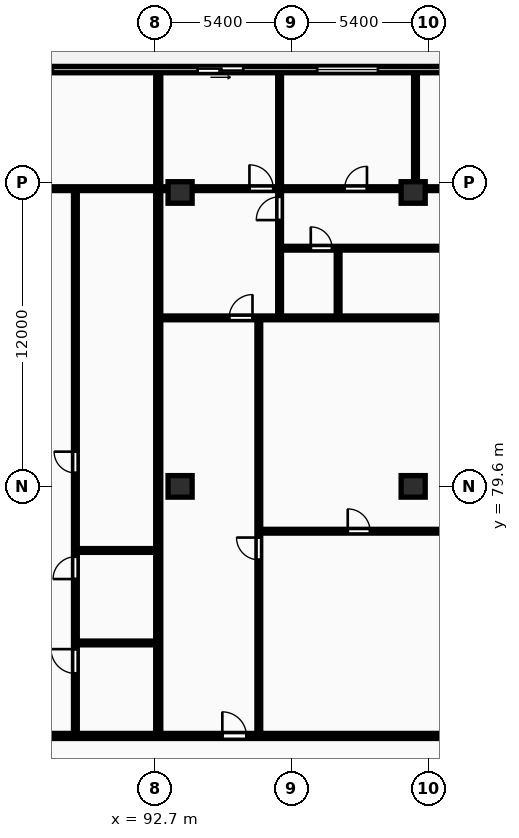
"""IFC4 building model, lengths in metres.
Left out: names, types, materials, properties, quantities, classifications, styles, units other than length and angle.
Written with IfcOpenShell. Run it as: python <this file> out.ifc"""

import sys

from ifc_helpers import new_model, si_unit, direction, frame, frame_2d, origin, origin_2d, place, context, subcontext, project, spatial, rectangle, extrude, element, fill, save


model = new_model("IFC4")
c1 = context("Model", 3, precision=1e-05, world=origin(), true_north=direction((0.0, 1.0)))
c2 = subcontext(c1, "Body", "Model", "MODEL_VIEW")
j1 = project(units=[si_unit("LENGTHUNIT", "METRE"), si_unit("PLANEANGLEUNIT", "RADIAN")], contexts=[c1])
p1 = place(None, origin())
s1 = spatial("IfcSite", under=j1, at=p1, CompositionType="ELEMENT")
p2 = place(p1, origin())
s2 = spatial("IfcBuilding", under=s1, at=p2, CompositionType="ELEMENT")
p3 = place(p2, frame((0.0, 0.0, 126.3)))
s3 = spatial("IfcBuildingStorey", under=s2, at=p3, CompositionType="ELEMENT", Elevation=126.3)
for number, where, z_axis, x_axis in (
    (1, (93.7, 79.6, 0.0), (0.0, 0.0, 1.0), (1.0, 0.0, 0.0)),
    (2, (93.7, 91.2, 0.0), (0.0, 0.0, 1.0), (1.0, 0.0, 0.0)),
    (3, (102.9, 79.6, 0.0), (0.0, 0.0, 1.0), (1.0, 0.0, 0.0)),
    (4, (102.9, 91.2, 0.0), (0.0, 0.0, 1.0), (1.0, 0.0, 0.0)),
):
    element("IfcColumn", number, at=place(p3, frame(where, z_axis=z_axis, x_axis=x_axis)), inside=s3, PredefinedType="COLUMN", context=c2, shape_type="SweptSolid", body=[
        extrude(rectangle(XDim=0.95, YDim=0.85, at=origin_2d()), origin(), (0.0, 0.0, 1.0), 3.25),
    ])
p4 = place(p3, frame((130.6, 96.05, 0.0), z_axis=(0.0, 0.0, 1.0), x_axis=(-1.0, 0.0, 0.0)))
e5 = element("IfcWall", 5, at=p4, inside=s3, PredefinedType="STANDARD", context=c2, shape_type="SweptSolid", body=[
    extrude(rectangle(XDim=73.0, YDim=0.25, at=frame_2d((36.5, 0.0))), origin(), (0.0, 0.0, 1.0), 2.97),
])
p5 = place(p4, frame((68.591, 0.0, 0.0)))
e6 = element("IfcOpeningElement", 6, at=p5, cuts=e5, PredefinedType="OPENING", context=c2, shape_type="SweptSolid", body=[
    extrude(rectangle(XDim=1.8, YDim=2.2, at=frame_2d((0.9, 1.1))), frame((0.0, 0.135, 0.0), z_axis=(0.0, -1.0, 0.0), x_axis=(1.0, 0.0, 0.0)), (0.0, 0.0, 1.0), 0.27),
])
p6 = place(p4, frame((60.092, 0.0, 0.85)))
e7 = element("IfcOpeningElement", 7, at=p6, cuts=e5, PredefinedType="OPENING", context=c2, shape_type="SweptSolid", body=[
    extrude(rectangle(XDim=2.4, YDim=1.9, at=frame_2d((1.2, 0.95))), frame((0.0, 0.135, 0.0), z_axis=(0.0, -1.0, 0.0), x_axis=(1.0, 0.0, 0.0)), (0.0, 0.0, 1.0), 0.27),
])
p7 = place(p4, frame((51.405, 0.0, 0.0)))
e8 = element("IfcOpeningElement", 8, at=p7, cuts=e5, PredefinedType="OPENING", context=c2, shape_type="SweptSolid", body=[
    extrude(rectangle(XDim=1.8, YDim=2.2, at=frame_2d((0.9, 1.1))), frame((0.0, 0.135, 0.0), z_axis=(0.0, -1.0, 0.0), x_axis=(1.0, 0.0, 0.0)), (0.0, 0.0, 1.0), 0.27),
])
p8 = place(p4, frame((41.925, 0.0, 0.85)))
e9 = element("IfcOpeningElement", 9, at=p8, cuts=e5, PredefinedType="OPENING", context=c2, shape_type="SweptSolid", body=[
    extrude(rectangle(XDim=2.4, YDim=1.9, at=frame_2d((1.2, 0.95))), frame((0.0, 0.135, 0.0), z_axis=(0.0, -1.0, 0.0), x_axis=(1.0, 0.0, 0.0)), (0.0, 0.0, 1.0), 0.27),
])
p9 = place(p4, frame((29.091, 0.0, 0.85)))
e10 = element("IfcOpeningElement", 10, at=p9, cuts=e5, PredefinedType="OPENING", context=c2, shape_type="SweptSolid", body=[
    extrude(rectangle(XDim=2.4, YDim=1.9, at=frame_2d((1.2, 0.95))), frame((0.0, 0.135, 0.0), z_axis=(0.0, -1.0, 0.0), x_axis=(1.0, 0.0, 0.0)), (0.0, 0.0, 1.0), 0.27),
])
p10 = place(p4, frame((23.727, 0.0, 0.85)))
e11 = element("IfcOpeningElement", 11, at=p10, cuts=e5, PredefinedType="OPENING", context=c2, shape_type="SweptSolid", body=[
    extrude(rectangle(XDim=2.4, YDim=1.9, at=frame_2d((1.2, 0.95))), frame((0.0, 0.135, 0.0), z_axis=(0.0, -1.0, 0.0), x_axis=(1.0, 0.0, 0.0)), (0.0, 0.0, 1.0), 0.27),
])
p11 = place(p4, frame((34.407, 0.0, 0.0)))
e12 = element("IfcOpeningElement", 12, at=p11, cuts=e5, PredefinedType="OPENING", context=c2, shape_type="SweptSolid", body=[
    extrude(rectangle(XDim=1.8, YDim=2.2, at=frame_2d((0.9, 1.1))), frame((0.0, 0.135, 0.0), z_axis=(0.0, -1.0, 0.0), x_axis=(1.0, 0.0, 0.0)), (0.0, 0.0, 1.0), 0.27),
])
p12 = place(p4, frame((18.72, 0.0, 0.85)))
e13 = element("IfcOpeningElement", 13, at=p12, cuts=e5, PredefinedType="OPENING", context=c2, shape_type="SweptSolid", body=[
    extrude(rectangle(XDim=2.4, YDim=1.9, at=frame_2d((1.2, 0.95))), frame((0.0, 0.135, 0.0), z_axis=(0.0, -1.0, 0.0), x_axis=(1.0, 0.0, 0.0)), (0.0, 0.0, 1.0), 0.27),
])
p13 = place(p4, frame((9.169, 0.0, 0.85)))
e14 = element("IfcOpeningElement", 14, at=p13, cuts=e5, PredefinedType="OPENING", context=c2, shape_type="SweptSolid", body=[
    extrude(rectangle(XDim=2.4, YDim=1.9, at=frame_2d((1.2, 0.95))), frame((0.0, 0.135, 0.0), z_axis=(0.0, -1.0, 0.0), x_axis=(1.0, 0.0, 0.0)), (0.0, 0.0, 1.0), 0.27),
])
p14 = place(p4, frame((5.506, 0.0, 0.85)))
e15 = element("IfcOpeningElement", 15, at=p14, cuts=e5, PredefinedType="OPENING", context=c2, shape_type="SweptSolid", body=[
    extrude(rectangle(XDim=1.8, YDim=1.8, at=frame_2d((0.9, 0.9))), frame((0.0, 0.135, 0.0), z_axis=(0.0, -1.0, 0.0), x_axis=(1.0, 0.0, 0.0)), (0.0, 0.0, 1.0), 0.27),
])
p15 = place(p4, frame((14.015, 0.0, 0.0)))
e16 = element("IfcOpeningElement", 16, at=p15, cuts=e5, PredefinedType="OPENING", context=c2, shape_type="SweptSolid", body=[
    extrude(rectangle(XDim=1.8, YDim=2.2, at=frame_2d((0.9, 1.1))), frame((0.0, 0.135, 0.0), z_axis=(0.0, -1.0, 0.0), x_axis=(1.0, 0.0, 0.0)), (0.0, 0.0, 1.0), 0.27),
])
p16 = place(p4, frame((1.135, 0.0, 0.85)))
e17 = element("IfcOpeningElement", 17, at=p16, cuts=e5, PredefinedType="OPENING", context=c2, shape_type="SweptSolid", body=[
    extrude(rectangle(XDim=2.4, YDim=1.9, at=frame_2d((1.2, 0.95))), frame((0.0, 0.135, 0.0), z_axis=(0.0, -1.0, 0.0), x_axis=(1.0, 0.0, 0.0)), (0.0, 0.0, 1.0), 0.27),
])
p17 = place(p3, frame((92.837, 69.83, 0.0), z_axis=(0.0, 0.0, 1.0), x_axis=(0.0, 1.0, 0.0)))
e18 = element("IfcWall", 18, at=p17, inside=s3, PredefinedType="PARTITIONING", context=c2, shape_type="SweptSolid", body=[
    extrude(rectangle(XDim=26.07, YDim=0.2, at=frame_2d((13.035, 0.0))), origin(), (0.0, 0.0, 1.0), 2.97),
])
for number, where, z_axis, x_axis in (
    (19, (89.627, 73.42, 0.0), (0.0, 0.0, 1.0), (1.0, 0.0, 0.0)),
    (20, (89.627, 77.07, 0.0), (0.0, 0.0, 1.0), (1.0, 0.0, 0.0)),
):
    element("IfcWall", number, at=place(p3, frame(where, z_axis=z_axis, x_axis=x_axis)), inside=s3, PredefinedType="PARTITIONING", context=c2, shape_type="SweptSolid", body=[
        extrude(rectangle(XDim=3.13, YDim=0.15, at=frame_2d((1.565, 0.0))), origin(), (0.0, 0.0, 1.0), 2.97),
    ])
p18 = place(p3, frame((89.567, 69.81, 0.0), z_axis=(0.0, 0.0, 1.0), x_axis=(0.0, 1.0, 0.0)))
e21 = element("IfcWall", 21, at=p18, inside=s3, PredefinedType="PARTITIONING", context=c2, shape_type="SweptSolid", body=[
    extrude(rectangle(XDim=21.48, YDim=0.15, at=frame_2d((10.74, 0.0))), origin(), (0.0, 0.0, 1.0), 2.97),
])
p19 = place(p18, frame((2.406, 0.0, 0.0)))
e22 = element("IfcOpeningElement", 22, at=p19, cuts=e21, PredefinedType="OPENING", context=c2, shape_type="SweptSolid", body=[
    extrude(rectangle(XDim=0.96, YDim=2.1, at=frame_2d((0.48, 1.05))), frame((0.0, 0.085, 0.0), z_axis=(0.0, -1.0, 0.0), x_axis=(1.0, 0.0, 0.0)), (0.0, 0.0, 1.0), 0.17),
])
p20 = place(p18, frame((6.133, 0.0, 0.0)))
e23 = element("IfcOpeningElement", 23, at=p20, cuts=e21, PredefinedType="OPENING", context=c2, shape_type="SweptSolid", body=[
    extrude(rectangle(XDim=0.88, YDim=2.06, at=frame_2d((0.44, 1.03))), frame((0.0, 0.085, 0.0), z_axis=(0.0, -1.0, 0.0), x_axis=(1.0, 0.0, 0.0)), (0.0, 0.0, 1.0), 0.17),
])
p21 = place(p18, frame((10.32, 0.0, 0.0)))
e24 = element("IfcOpeningElement", 24, at=p21, cuts=e21, PredefinedType="OPENING", context=c2, shape_type="SweptSolid", body=[
    extrude(rectangle(XDim=0.84, YDim=2.04, at=frame_2d((0.42, 1.02))), frame((0.0, 0.085, 0.0), z_axis=(0.0, -1.0, 0.0), x_axis=(1.0, 0.0, 0.0)), (0.0, 0.0, 1.0), 0.17),
])
p22 = place(p3, frame((74.317, 91.35, 0.0), z_axis=(0.0, 0.0, 1.0), x_axis=(1.0, 0.0, 0.0)))
e25 = element("IfcWall", 25, at=p22, inside=s3, PredefinedType="PARTITIONING", context=c2, shape_type="SweptSolid", body=[
    extrude(rectangle(XDim=18.44, YDim=0.15, at=frame_2d((9.22, 0.0))), origin(), (0.0, 0.0, 1.0), 2.663),
])
p23 = place(p22, frame((6.725, 0.0, 0.0)))
e26 = element("IfcOpeningElement", 26, at=p23, cuts=e25, PredefinedType="OPENING", context=c2, shape_type="SweptSolid", body=[
    extrude(rectangle(XDim=0.94, YDim=2.1, at=frame_2d((0.47, 1.05))), frame((0.0, 0.085, 0.0), z_axis=(0.0, -1.0, 0.0), x_axis=(1.0, 0.0, 0.0)), (0.0, 0.0, 1.0), 0.17),
])
p24 = place(p22, frame((11.938, 0.0, 0.0)))
e27 = element("IfcOpeningElement", 27, at=p24, cuts=e25, PredefinedType="OPENING", context=c2, shape_type="SweptSolid", body=[
    extrude(rectangle(XDim=0.94, YDim=2.1, at=frame_2d((0.47, 1.05))), frame((0.0, 0.085, 0.0), z_axis=(0.0, -1.0, 0.0), x_axis=(1.0, 0.0, 0.0)), (0.0, 0.0, 1.0), 0.17),
])
p25 = place(p3, frame((96.867, 77.83, 0.0), z_axis=(0.0, 0.0, 1.0), x_axis=(1.0, 0.0, 0.0)))
e28 = element("IfcWall", 28, at=p25, inside=s3, PredefinedType="PARTITIONING", context=c2, shape_type="SweptSolid", body=[
    extrude(rectangle(XDim=16.177, YDim=0.15, at=frame_2d((8.089, 0.0))), origin(), (0.0, 0.0, 1.0), 2.97),
])
p26 = place(p25, frame((3.45, 0.0, 0.0)))
e29 = element("IfcOpeningElement", 29, at=p26, cuts=e28, PredefinedType="OPENING", context=c2, shape_type="SweptSolid", body=[
    extrude(rectangle(XDim=0.88, YDim=2.06, at=frame_2d((0.44, 1.03))), frame((0.0, 0.085, 0.0), z_axis=(0.0, -1.0, 0.0), x_axis=(1.0, 0.0, 0.0)), (0.0, 0.0, 1.0), 0.17),
])
p27 = place(p3, frame((96.808, 69.81, 0.0), z_axis=(0.0, 0.0, 1.0), x_axis=(0.0, 1.0, 0.0)))
e30 = element("IfcWall", 30, at=p27, inside=s3, PredefinedType="PARTITIONING", context=c2, shape_type="SweptSolid", body=[
    extrude(rectangle(XDim=16.4, YDim=0.15, at=frame_2d((8.2, 0.0))), origin(), (0.0, 0.0, 1.0), 2.97),
])
p28 = place(p27, frame((6.89, 0.0, 0.0)))
e31 = element("IfcOpeningElement", 31, at=p28, cuts=e30, PredefinedType="OPENING", context=c2, shape_type="SweptSolid", body=[
    extrude(rectangle(XDim=0.88, YDim=2.06, at=frame_2d((0.44, 1.03))), frame((0.0, 0.085, 0.0), z_axis=(0.0, -1.0, 0.0), x_axis=(1.0, 0.0, 0.0)), (0.0, 0.0, 1.0), 0.17),
])
p29 = place(p3, frame((99.938, 86.29, 0.0), z_axis=(0.0, 0.0, 1.0), x_axis=(0.0, 1.0, 0.0)))
e32 = element("IfcWall", 32, at=p29, inside=s3, PredefinedType="PARTITIONING", context=c2, shape_type="SweptSolid", body=[
    extrude(rectangle(XDim=2.69, YDim=0.15, at=frame_2d((1.345, 0.0))), origin(), (0.0, 0.0, 1.0), 2.97),
])
p30 = place(p3, frame((102.991, 91.43, 0.0), z_axis=(0.0, 0.0, 1.0), x_axis=(0.0, 1.0, 0.0)))
e33 = element("IfcWall", 33, at=p30, inside=s3, PredefinedType="PARTITIONING", context=c2, shape_type="SweptSolid", body=[
    extrude(rectangle(XDim=4.47, YDim=0.15, at=frame_2d((2.235, 0.0))), origin(), (0.0, 0.0, 1.0), 2.97),
])
p31 = place(p3, frame((97.627, 86.29, 0.0), z_axis=(0.0, 0.0, 1.0), x_axis=(0.0, 1.0, 0.0)))
e34 = element("IfcWall", 34, at=p31, inside=s3, PredefinedType="PARTITIONING", context=c2, shape_type="SweptSolid", body=[
    extrude(rectangle(XDim=9.61, YDim=0.15, at=frame_2d((4.805, 0.0))), origin(), (0.0, 0.0, 1.0), 2.97),
])
p32 = place(p31, frame((3.82, 0.0, 0.0)))
e35 = element("IfcOpeningElement", 35, at=p32, cuts=e34, PredefinedType="OPENING", context=c2, shape_type="SweptSolid", body=[
    extrude(rectangle(XDim=0.92, YDim=2.08, at=frame_2d((0.46, 1.04))), frame((0.0, 0.085, 0.0), z_axis=(0.0, -1.0, 0.0), x_axis=(1.0, 0.0, 0.0)), (0.0, 0.0, 1.0), 0.17),
])
p33 = place(p3, frame((97.667, 89.0, 0.0), z_axis=(0.0, 0.0, 1.0), x_axis=(1.0, 0.0, 0.0)))
e36 = element("IfcWall", 36, at=p33, inside=s3, PredefinedType="PARTITIONING", context=c2, shape_type="SweptSolid", body=[
    extrude(rectangle(XDim=15.377, YDim=0.15, at=frame_2d((7.689, 0.0))), origin(), (0.0, 0.0, 1.0), 2.97),
])
p34 = place(p33, frame((1.191, 0.0, 0.0)))
e37 = element("IfcOpeningElement", 37, at=p34, cuts=e36, PredefinedType="OPENING", context=c2, shape_type="SweptSolid", body=[
    extrude(rectangle(XDim=0.84, YDim=2.04, at=frame_2d((0.42, 1.02))), frame((0.0, 0.085, 0.0), z_axis=(0.0, -1.0, 0.0), x_axis=(1.0, 0.0, 0.0)), (0.0, 0.0, 1.0), 0.17),
])
p35 = place(p33, frame((7.269, 0.0, 0.0)))
e38 = element("IfcOpeningElement", 38, at=p35, cuts=e36, PredefinedType="OPENING", context=c2, shape_type="SweptSolid", body=[
    extrude(rectangle(XDim=0.84, YDim=2.04, at=frame_2d((0.42, 1.02))), frame((0.0, 0.085, 0.0), z_axis=(0.0, -1.0, 0.0), x_axis=(1.0, 0.0, 0.0)), (0.0, 0.0, 1.0), 0.17),
])
p36 = place(p33, frame((10.938, 0.0, 0.0)))
e39 = element("IfcOpeningElement", 39, at=p36, cuts=e36, PredefinedType="OPENING", context=c2, shape_type="SweptSolid", body=[
    extrude(rectangle(XDim=0.84, YDim=2.04, at=frame_2d((0.42, 1.02))), frame((0.0, 0.085, 0.0), z_axis=(0.0, -1.0, 0.0), x_axis=(1.0, 0.0, 0.0)), (0.0, 0.0, 1.0), 0.17),
])
p37 = place(p3, frame((92.917, 86.25, 0.0), z_axis=(0.0, 0.0, 1.0), x_axis=(1.0, 0.0, 0.0)))
e40 = element("IfcWall", 40, at=p37, inside=s3, PredefinedType="PARTITIONING", context=c2, shape_type="SweptSolid", body=[
    extrude(rectangle(XDim=20.127, YDim=0.15, at=frame_2d((10.064, 0.0))), origin(), (0.0, 0.0, 1.0), 2.97),
])
p38 = place(p37, frame((2.72, 0.0, 0.0)))
e41 = element("IfcOpeningElement", 41, at=p38, cuts=e40, PredefinedType="OPENING", context=c2, shape_type="SweptSolid", body=[
    extrude(rectangle(XDim=0.92, YDim=2.08, at=frame_2d((0.46, 1.04))), frame((0.0, 0.085, 0.0), z_axis=(0.0, -1.0, 0.0), x_axis=(1.0, 0.0, 0.0)), (0.0, 0.0, 1.0), 0.17),
])
p39 = place(p3, frame((92.917, 91.35, 0.0), z_axis=(0.0, 0.0, 1.0), x_axis=(1.0, 0.0, 0.0)))
e42 = element("IfcWall", 42, at=p39, inside=s3, PredefinedType="PARTITIONING", context=c2, shape_type="SweptSolid", body=[
    extrude(rectangle(XDim=15.438, YDim=0.15, at=frame_2d((7.719, 0.0))), origin(), (0.0, 0.0, 1.0), 2.663),
])
p40 = place(p39, frame((3.52, 0.0, 0.0)))
e43 = element("IfcOpeningElement", 43, at=p40, cuts=e42, PredefinedType="OPENING", context=c2, shape_type="SweptSolid", body=[
    extrude(rectangle(XDim=0.94, YDim=2.1, at=frame_2d((0.47, 1.05))), frame((0.0, 0.085, 0.0), z_axis=(0.0, -1.0, 0.0), x_axis=(1.0, 0.0, 0.0)), (0.0, 0.0, 1.0), 0.17),
])
p41 = place(p39, frame((7.279, 0.0, 0.0)))
e44 = element("IfcOpeningElement", 44, at=p41, cuts=e42, PredefinedType="OPENING", context=c2, shape_type="SweptSolid", body=[
    extrude(rectangle(XDim=0.88, YDim=2.06, at=frame_2d((0.44, 1.03))), frame((0.0, 0.085, 0.0), z_axis=(0.0, -1.0, 0.0), x_axis=(1.0, 0.0, 0.0)), (0.0, 0.0, 1.0), 0.17),
])
p42 = place(p39, frame((11.669, 0.0, 0.0)))
e45 = element("IfcOpeningElement", 45, at=p42, cuts=e42, PredefinedType="OPENING", context=c2, shape_type="SweptSolid", body=[
    extrude(rectangle(XDim=0.88, YDim=2.06, at=frame_2d((0.44, 1.03))), frame((0.0, 0.085, 0.0), z_axis=(0.0, -1.0, 0.0), x_axis=(1.0, 0.0, 0.0)), (0.0, 0.0, 1.0), 0.17),
])
p43 = place(p3, frame((57.6, 69.75, 0.0), z_axis=(0.0, 0.0, 1.0), x_axis=(1.0, 0.0, 0.0)))
e46 = element("IfcWall", 46, at=p43, inside=s3, PredefinedType="PARTITIONING", context=c2, shape_type="SweptSolid", body=[
    extrude(rectangle(XDim=73.0, YDim=0.2, at=frame_2d((36.5, 0.0))), origin(), (0.0, 0.0, 1.0), 2.97),
])
p44 = place(p43, frame((6.629, 0.0, 0.0)))
e47 = element("IfcOpeningElement", 47, at=p44, cuts=e46, PredefinedType="OPENING", context=c2, shape_type="SweptSolid", body=[
    extrude(rectangle(XDim=1.22, YDim=2.18, at=frame_2d((0.61, 1.09))), frame((0.0, 0.11, 0.0), z_axis=(0.0, -1.0, 0.0), x_axis=(1.0, 0.0, 0.0)), (0.0, 0.0, 1.0), 0.22),
])
p45 = place(p43, frame((24.022, 0.0, 0.0)))
e48 = element("IfcOpeningElement", 48, at=p45, cuts=e46, PredefinedType="OPENING", context=c2, shape_type="SweptSolid", body=[
    extrude(rectangle(XDim=1.22, YDim=2.18, at=frame_2d((0.61, 1.09))), frame((0.0, 0.11, 0.0), z_axis=(0.0, -1.0, 0.0), x_axis=(1.0, 0.0, 0.0)), (0.0, 0.0, 1.0), 0.22),
])
p46 = place(p43, frame((37.768, 0.0, 0.0)))
e49 = element("IfcOpeningElement", 49, at=p46, cuts=e46, PredefinedType="OPENING", context=c2, shape_type="SweptSolid", body=[
    extrude(rectangle(XDim=0.95, YDim=2.15, at=frame_2d((0.475, 1.075))), frame((0.0, 0.11, 0.0), z_axis=(0.0, -1.0, 0.0), x_axis=(1.0, 0.0, 0.0)), (0.0, 0.0, 1.0), 0.22),
])
p47 = place(p43, frame((57.57, 0.0, 0.0)))
e50 = element("IfcOpeningElement", 50, at=p47, cuts=e46, PredefinedType="OPENING", context=c2, shape_type="SweptSolid", body=[
    extrude(rectangle(XDim=0.95, YDim=2.15, at=frame_2d((0.475, 1.075))), frame((0.0, 0.11, 0.0), z_axis=(0.0, -1.0, 0.0), x_axis=(1.0, 0.0, 0.0)), (0.0, 0.0, 1.0), 0.22),
])
p48 = place(p8, origin())
e51 = element("IfcWindow", 51, at=p48, inside=s3, PartitioningType="DOUBLE_PANEL_VERTICAL", PredefinedType="WINDOW", context=c2, shape_type="SweptSolid", body=[
    extrude(rectangle(XDim=2.4, YDim=1.9, at=frame_2d((1.2, 0.95))), frame((0.0, 0.03, 0.0), z_axis=(0.0, -1.0, 0.0), x_axis=(1.0, 0.0, 0.0)), (0.0, 0.0, 1.0), 0.06),
])
fill(e9, e51)
p49 = place(p9, origin())
e52 = element("IfcWindow", 52, at=p49, inside=s3, PartitioningType="DOUBLE_PANEL_VERTICAL", PredefinedType="WINDOW", context=c2, shape_type="SweptSolid", body=[
    extrude(rectangle(XDim=2.4, YDim=1.9, at=frame_2d((1.2, 0.95))), frame((0.0, 0.03, 0.0), z_axis=(0.0, -1.0, 0.0), x_axis=(1.0, 0.0, 0.0)), (0.0, 0.0, 1.0), 0.06),
])
fill(e10, e52)
p50 = place(p11, origin())
e53 = element("IfcDoor", 53, at=p50, inside=s3, OperationType="SLIDING_TO_LEFT", PredefinedType="DOOR", context=c2, shape_type="SweptSolid", body=[
    extrude(rectangle(XDim=1.8, YDim=2.2, at=frame_2d((0.9, 1.1))), frame((0.0, 0.025, 0.0), z_axis=(0.0, -1.0, 0.0), x_axis=(1.0, 0.0, 0.0)), (0.0, 0.0, 1.0), 0.05),
])
fill(e12, e53)
p51 = place(p19, origin())
e54 = element("IfcDoor", 54, at=p51, inside=s3, OperationType="SINGLE_SWING_RIGHT", PredefinedType="DOOR", context=c2, shape_type="SweptSolid", body=[
    extrude(rectangle(XDim=0.96, YDim=2.1, at=frame_2d((0.48, 1.05))), frame((0.0, 0.025, 0.0), z_axis=(0.0, -1.0, 0.0), x_axis=(1.0, 0.0, 0.0)), (0.0, 0.0, 1.0), 0.05),
])
fill(e22, e54)
p52 = place(p20, origin())
e55 = element("IfcDoor", 55, at=p52, inside=s3, OperationType="SINGLE_SWING_LEFT", PredefinedType="DOOR", context=c2, shape_type="SweptSolid", body=[
    extrude(rectangle(XDim=0.88, YDim=2.06, at=frame_2d((0.44, 1.03))), frame((0.0, 0.025, 0.0), z_axis=(0.0, -1.0, 0.0), x_axis=(1.0, 0.0, 0.0)), (0.0, 0.0, 1.0), 0.05),
])
fill(e23, e55)
p53 = place(p21, origin())
e56 = element("IfcDoor", 56, at=p53, inside=s3, OperationType="SINGLE_SWING_RIGHT", PredefinedType="DOOR", context=c2, shape_type="SweptSolid", body=[
    extrude(rectangle(XDim=0.84, YDim=2.04, at=frame_2d((0.42, 1.02))), frame((0.0, 0.025, 0.0), z_axis=(0.0, -1.0, 0.0), x_axis=(1.0, 0.0, 0.0)), (0.0, 0.0, 1.0), 0.05),
])
fill(e24, e56)
p54 = place(p26, origin())
e57 = element("IfcDoor", 57, at=p54, inside=s3, OperationType="SINGLE_SWING_LEFT", PredefinedType="DOOR", context=c2, shape_type="SweptSolid", body=[
    extrude(rectangle(XDim=0.88, YDim=2.06, at=frame_2d((0.44, 1.03))), frame((0.0, 0.025, 0.0), z_axis=(0.0, -1.0, 0.0), x_axis=(1.0, 0.0, 0.0)), (0.0, 0.0, 1.0), 0.05),
])
fill(e29, e57)
p55 = place(p28, origin())
e58 = element("IfcDoor", 58, at=p55, inside=s3, OperationType="SINGLE_SWING_RIGHT", PredefinedType="DOOR", context=c2, shape_type="SweptSolid", body=[
    extrude(rectangle(XDim=0.88, YDim=2.06, at=frame_2d((0.44, 1.03))), frame((0.0, 0.025, 0.0), z_axis=(0.0, -1.0, 0.0), x_axis=(1.0, 0.0, 0.0)), (0.0, 0.0, 1.0), 0.05),
])
fill(e31, e58)
p56 = place(p32, origin())
e59 = element("IfcDoor", 59, at=p56, inside=s3, OperationType="SINGLE_SWING_LEFT", PredefinedType="DOOR", context=c2, shape_type="SweptSolid", body=[
    extrude(rectangle(XDim=0.92, YDim=2.08, at=frame_2d((0.46, 1.04))), frame((0.0, 0.025, 0.0), z_axis=(0.0, -1.0, 0.0), x_axis=(1.0, 0.0, 0.0)), (0.0, 0.0, 1.0), 0.05),
])
fill(e35, e59)
p57 = place(p34, origin())
e60 = element("IfcDoor", 60, at=p57, inside=s3, OperationType="SINGLE_SWING_LEFT", PredefinedType="DOOR", context=c2, shape_type="SweptSolid", body=[
    extrude(rectangle(XDim=0.84, YDim=2.04, at=frame_2d((0.42, 1.02))), frame((0.0, 0.025, 0.0), z_axis=(0.0, -1.0, 0.0), x_axis=(1.0, 0.0, 0.0)), (0.0, 0.0, 1.0), 0.05),
])
fill(e37, e60)
p58 = place(p38, origin())
e61 = element("IfcDoor", 61, at=p58, inside=s3, OperationType="SINGLE_SWING_RIGHT", PredefinedType="DOOR", context=c2, shape_type="SweptSolid", body=[
    extrude(rectangle(XDim=0.92, YDim=2.08, at=frame_2d((0.46, 1.04))), frame((0.0, 0.025, 0.0), z_axis=(0.0, -1.0, 0.0), x_axis=(1.0, 0.0, 0.0)), (0.0, 0.0, 1.0), 0.05),
])
fill(e41, e61)
p59 = place(p40, origin())
e62 = element("IfcDoor", 62, at=p59, inside=s3, OperationType="SINGLE_SWING_LEFT", PredefinedType="DOOR", context=c2, shape_type="SweptSolid", body=[
    extrude(rectangle(XDim=0.94, YDim=2.1, at=frame_2d((0.47, 1.05))), frame((0.0, 0.025, 0.0), z_axis=(0.0, -1.0, 0.0), x_axis=(1.0, 0.0, 0.0)), (0.0, 0.0, 1.0), 0.05),
])
fill(e43, e62)
p60 = place(p41, origin())
e63 = element("IfcDoor", 63, at=p60, inside=s3, OperationType="SINGLE_SWING_RIGHT", PredefinedType="DOOR", context=c2, shape_type="SweptSolid", body=[
    extrude(rectangle(XDim=0.88, YDim=2.06, at=frame_2d((0.44, 1.03))), frame((0.0, 0.025, 0.0), z_axis=(0.0, -1.0, 0.0), x_axis=(1.0, 0.0, 0.0)), (0.0, 0.0, 1.0), 0.05),
])
fill(e44, e63)
p61 = place(p46, origin())
e64 = element("IfcDoor", 64, at=p61, inside=s3, OperationType="SINGLE_SWING_LEFT", PredefinedType="DOOR", context=c2, shape_type="SweptSolid", body=[
    extrude(rectangle(XDim=0.95, YDim=2.15, at=frame_2d((0.475, 1.075))), frame((0.0, 0.025, 0.0), z_axis=(0.0, -1.0, 0.0), x_axis=(1.0, 0.0, 0.0)), (0.0, 0.0, 1.0), 0.05),
])
fill(e49, e64)
save(model, sys.argv[1])
